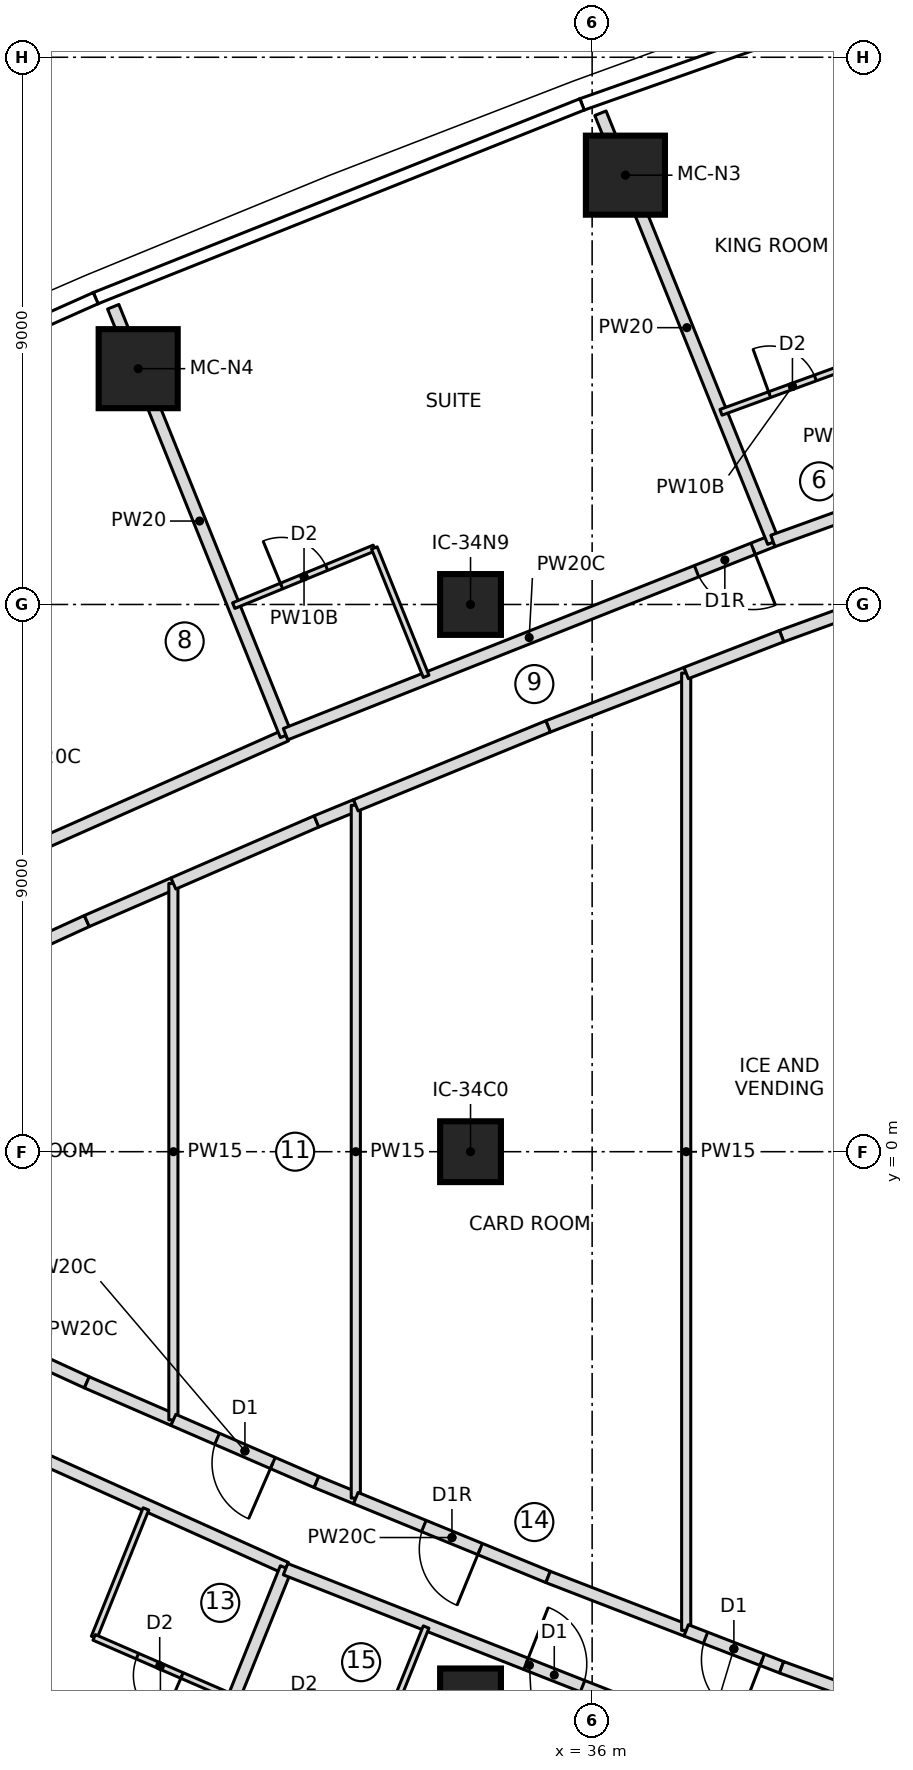
"""IFC4 building model, lengths in metres.
Left out: names, types, materials, properties, quantities, classifications, styles, units other than length and angle.
Written with IfcOpenShell. Run it as: python <this file> out.ifc"""

import sys

from ifc_helpers import new_model, si_unit, direction, frame, frame_2d, origin, origin_2d, place, context, subcontext, project, spatial, rectangle, extrude, element, fill, save


model = new_model("IFC4")
c1 = context("Model", 3, precision=1e-05, world=origin(), true_north=direction((0.0, 1.0)))
c2 = subcontext(c1, "Body", "Model", "MODEL_VIEW")
j1 = project(units=[si_unit("LENGTHUNIT", "METRE"), si_unit("PLANEANGLEUNIT", "RADIAN")], contexts=[c1])
p1 = place(None, origin())
s1 = spatial("IfcSite", under=j1, at=p1, CompositionType="ELEMENT")
p2 = place(p1, origin())
s2 = spatial("IfcBuilding", under=s1, at=p2, CompositionType="ELEMENT")
p3 = place(p2, frame((0.0, 0.0, 175.5)))
s3 = spatial("IfcBuildingStorey", under=s2, at=p3, CompositionType="ELEMENT", Elevation=175.5)
for number, where, z_axis, x_axis in (
    (1, (36.547, 16.061, 0.0), (0.0, 0.0, 1.0), (1.0, 0.0, 0.0)),
    (2, (28.534, 12.878, 0.0), (0.0, 0.0, 1.0), (1.0, 0.0, 0.0)),
):
    element("IfcColumn", number, at=place(p3, frame(where, z_axis=z_axis, x_axis=x_axis)), inside=s3, PredefinedType="COLUMN", context=c2, shape_type="SweptSolid", body=[
        extrude(rectangle(XDim=1.3, YDim=1.3, at=origin_2d()), origin(), (0.0, 0.0, 1.0), 3.55),
    ])
for number, where, z_axis, x_axis in (
    (3, (34.0, -9.0, 0.0), (0.0, 0.0, 1.0), (1.0, 0.0, 0.0)),
    (4, (34.0, 0.0, 0.0), (0.0, 0.0, 1.0), (1.0, 0.0, 0.0)),
    (5, (34.0, 9.0, 0.0), (0.0, 0.0, 1.0), (1.0, 0.0, 0.0)),
):
    element("IfcColumn", number, at=place(p3, frame(where, z_axis=z_axis, x_axis=x_axis)), inside=s3, PredefinedType="COLUMN", context=c2, shape_type="SweptSolid", body=[
        extrude(rectangle(XDim=1.0, YDim=1.0, at=origin_2d()), origin(), (0.0, 0.0, 1.0), 3.55),
    ])
p4 = place(p3, frame((23.085, 3.351, 0.0), z_axis=(0.0, 0.0, 1.0), x_axis=(0.914065936171, 0.405565610392, 0.0)))
e6 = element("IfcWall", 6, at=p4, inside=s3, PredefinedType="PARTITIONING", context=c2, shape_type="SweptSolid", body=[
    extrude(rectangle(XDim=8.622, YDim=0.2, at=frame_2d((4.311, 0.0))), origin(), (0.0, 0.0, 1.0), 3.25),
])
p5 = place(p4, frame((3.05, 0.0, 0.0)))
e7 = element("IfcOpeningElement", 7, at=p5, cuts=e6, PredefinedType="OPENING", context=c2, shape_type="SweptSolid", body=[
    extrude(rectangle(XDim=1.0, YDim=2.1, at=frame_2d((0.5, 1.05))), frame((0.0, 0.11, 0.0), z_axis=(0.0, -1.0, 0.0), x_axis=(1.0, 0.0, 0.0)), (0.0, 0.0, 1.0), 0.22),
])
p6 = place(p3, frame((30.965, 6.848, 0.0), z_axis=(0.0, 0.0, 1.0), x_axis=(-0.373876084216, 0.927478664796, 0.0)))
e8 = element("IfcWall", 8, at=p6, inside=s3, PredefinedType="PARTITIONING", context=c2, shape_type="SweptSolid", body=[
    extrude(rectangle(XDim=7.6, YDim=0.2, at=frame_2d((3.8, 0.0))), origin(), (0.0, 0.0, 1.0), 3.25),
])
p7 = place(p3, frame((38.972, 10.045, 0.0), z_axis=(0.0, 0.0, 1.0), x_axis=(-0.929554647243, -0.368684360651, 0.0)))
e9 = element("IfcWall", 9, at=p7, inside=s3, PredefinedType="PARTITIONING", context=c2, shape_type="SweptSolid", body=[
    extrude(rectangle(XDim=8.622, YDim=0.2, at=frame_2d((4.311, 0.0))), origin(), (0.0, 0.0, 1.0), 3.25),
])
p8 = place(p7, frame((0.35, 0.0, 0.0)))
e10 = element("IfcOpeningElement", 10, at=p8, cuts=e9, PredefinedType="OPENING", context=c2, shape_type="SweptSolid", body=[
    extrude(rectangle(XDim=1.0, YDim=2.1, at=frame_2d((0.5, 1.05))), frame((0.0, 0.11, 0.0), z_axis=(0.0, -1.0, 0.0), x_axis=(1.0, 0.0, 0.0)), (0.0, 0.0, 1.0), 0.22),
])
p9 = place(p3, frame((30.105, 8.981, 0.0), z_axis=(0.0, 0.0, 1.0), x_axis=(0.92519499486, 0.379492057212, 0.0)))
e11 = element("IfcWall", 11, at=p9, inside=s3, PredefinedType="PARTITIONING", context=c2, shape_type="SweptSolid", body=[
    extrude(rectangle(XDim=2.5, YDim=0.1, at=frame_2d((1.25, 0.0))), origin(), (0.0, 0.0, 1.0), 3.25),
])
p10 = place(p9, frame((0.85, 0.0, 0.0)))
e12 = element("IfcOpeningElement", 12, at=p10, cuts=e11, PredefinedType="OPENING", context=c2, shape_type="SweptSolid", body=[
    extrude(rectangle(XDim=0.8, YDim=2.1, at=frame_2d((0.4, 1.05))), frame((0.0, 0.06, 0.0), z_axis=(0.0, -1.0, 0.0), x_axis=(1.0, 0.0, 0.0)), (0.0, 0.0, 1.0), 0.12),
])
p11 = place(p3, frame((32.418, 9.93, 0.0), z_axis=(0.0, 0.0, 1.0), x_axis=(0.373847853912, -0.927490044219, 0.0)))
e13 = element("IfcWall", 13, at=p11, inside=s3, PredefinedType="PARTITIONING", context=c2, shape_type="SweptSolid", body=[
    extrude(rectangle(XDim=2.277, YDim=0.1, at=frame_2d((1.139, 0.0))), origin(), (0.0, 0.0, 1.0), 3.25),
])
p12 = place(p3, frame((38.98, 10.026, 0.0), z_axis=(0.0, 0.0, 1.0), x_axis=(-0.373863662938, 0.927483671843, 0.0)))
e14 = element("IfcWall", 14, at=p12, inside=s3, PredefinedType="PARTITIONING", context=c2, shape_type="SweptSolid", body=[
    extrude(rectangle(XDim=7.604, YDim=0.2, at=frame_2d((3.802, 0.0))), origin(), (0.0, 0.0, 1.0), 3.25),
])
p13 = place(p3, frame((43.026, 11.507, 0.0), z_axis=(0.0, 0.0, 1.0), x_axis=(-0.940653905433, -0.339367397069, 0.0)))
e15 = element("IfcWall", 15, at=p13, inside=s3, PredefinedType="PARTITIONING", context=c2, shape_type="SweptSolid", body=[
    extrude(rectangle(XDim=4.309, YDim=0.2, at=frame_2d((2.155, 0.0))), origin(), (0.0, 0.0, 1.0), 3.25),
])
p14 = place(p13, frame((0.4, 0.0, 0.0)))
e16 = element("IfcOpeningElement", 16, at=p14, cuts=e15, PredefinedType="OPENING", context=c2, shape_type="SweptSolid", body=[
    extrude(rectangle(XDim=1.0, YDim=2.1, at=frame_2d((0.5, 1.05))), frame((0.0, 0.11, 0.0), z_axis=(0.0, -1.0, 0.0), x_axis=(1.0, 0.0, 0.0)), (0.0, 0.0, 1.0), 0.22),
])
p15 = place(p3, frame((38.119, 12.161, 0.0), z_axis=(0.0, 0.0, 1.0), x_axis=(0.939744972593, 0.341876273652, 0.0)))
e17 = element("IfcWall", 17, at=p15, inside=s3, PredefinedType="PARTITIONING", context=c2, shape_type="SweptSolid", body=[
    extrude(rectangle(XDim=2.501, YDim=0.1, at=frame_2d((1.251, 0.0))), origin(), (0.0, 0.0, 1.0), 3.25),
])
p16 = place(p15, frame((0.85, 0.0, 0.0)))
e18 = element("IfcOpeningElement", 18, at=p16, cuts=e17, PredefinedType="OPENING", context=c2, shape_type="SweptSolid", body=[
    extrude(rectangle(XDim=0.8, YDim=2.1, at=frame_2d((0.4, 1.05))), frame((0.0, 0.06, 0.0), z_axis=(0.0, -1.0, 0.0), x_axis=(1.0, 0.0, 0.0)), (0.0, 0.0, 1.0), 0.12),
])
p17 = place(p3, frame((21.704, -2.685, 0.0), z_axis=(0.0, 0.0, 1.0), x_axis=(0.912095082087, -0.409978732659, 0.0)))
e19 = element("IfcWall", 19, at=p17, inside=s3, PredefinedType="PARTITIONING", context=c2, shape_type="SweptSolid", body=[
    extrude(rectangle(XDim=10.154, YDim=0.2, at=frame_2d((5.077, 0.0))), origin(), (0.0, 0.0, 1.0), 3.25),
])
p18 = place(p17, frame((0.45, 0.0, 0.0)))
e20 = element("IfcOpeningElement", 20, at=p18, cuts=e19, PredefinedType="OPENING", context=c2, shape_type="SweptSolid", body=[
    extrude(rectangle(XDim=1.5, YDim=2.1, at=frame_2d((0.75, 1.05))), frame((0.0, 0.11, 0.0), z_axis=(0.0, -1.0, 0.0), x_axis=(1.0, 0.0, 0.0)), (0.0, 0.0, 1.0), 0.22),
])
p19 = place(p3, frame((27.81, -7.988, 0.0), z_axis=(0.0, 0.0, 1.0), x_axis=(0.373865727953, 0.927482839443, 0.0)))
e21 = element("IfcWall", 21, at=p19, inside=s3, PredefinedType="PARTITIONING", context=c2, shape_type="SweptSolid", body=[
    extrude(rectangle(XDim=2.278, YDim=0.1, at=frame_2d((1.139, 0.0))), origin(), (0.0, 0.0, 1.0), 3.25),
])
p20 = place(p3, frame((29.989, -8.933, 0.0), z_axis=(0.0, 0.0, 1.0), x_axis=(-0.917386792713, 0.397996824805, 0.0)))
e22 = element("IfcWall", 22, at=p20, inside=s3, PredefinedType="PARTITIONING", context=c2, shape_type="SweptSolid", body=[
    extrude(rectangle(XDim=2.375, YDim=0.1, at=frame_2d((1.188, 0.0))), origin(), (0.0, 0.0, 1.0), 3.25),
])
p21 = place(p20, frame((0.8, 0.0, 0.0)))
e23 = element("IfcOpeningElement", 23, at=p21, cuts=e22, PredefinedType="OPENING", context=c2, shape_type="SweptSolid", body=[
    extrude(rectangle(XDim=0.8, YDim=2.1, at=frame_2d((0.4, 1.05))), frame((0.0, 0.06, 0.0), z_axis=(0.0, -1.0, 0.0), x_axis=(1.0, 0.0, 0.0)), (0.0, 0.0, 1.0), 0.12),
])
p22 = place(p3, frame((28.124, -13.897, 0.0), z_axis=(0.0, 0.0, 1.0), x_axis=(0.373876084216, 0.927478664796, 0.0)))
e24 = element("IfcWall", 24, at=p22, inside=s3, PredefinedType="PARTITIONING", context=c2, shape_type="SweptSolid", body=[
    extrude(rectangle(XDim=7.6, YDim=0.2, at=frame_2d((3.8, 0.0))), origin(), (0.0, 0.0, 1.0), 3.25),
])
p23 = place(p3, frame((30.958, -6.866, 0.0), z_axis=(0.0, 0.0, 1.0), x_axis=(0.93040517394, -0.366532689274, 0.0)))
e25 = element("IfcWall", 25, at=p23, inside=s3, PredefinedType="PARTITIONING", context=c2, shape_type="SweptSolid", body=[
    extrude(rectangle(XDim=8.622, YDim=0.2, at=frame_2d((4.311, 0.0))), origin(), (0.0, 0.0, 1.0), 3.25),
])
p24 = place(p23, frame((4.25, 0.0, 0.0)))
e26 = element("IfcOpeningElement", 26, at=p24, cuts=e25, PredefinedType="OPENING", context=c2, shape_type="SweptSolid", body=[
    extrude(rectangle(XDim=1.0, YDim=2.1, at=frame_2d((0.5, 1.05))), frame((0.0, 0.11, 0.0), z_axis=(0.0, -1.0, 0.0), x_axis=(1.0, 0.0, 0.0)), (0.0, 0.0, 1.0), 0.22),
])
p25 = place(p3, frame((33.27, -7.818, 0.0), z_axis=(0.0, 0.0, 1.0), x_axis=(-0.373847853912, -0.927490044219, 0.0)))
e27 = element("IfcWall", 27, at=p25, inside=s3, PredefinedType="PARTITIONING", context=c2, shape_type="SweptSolid", body=[
    extrude(rectangle(XDim=2.277, YDim=0.1, at=frame_2d((1.139, 0.0))), origin(), (0.0, 0.0, 1.0), 3.25),
])
p26 = place(p3, frame((27.69, -3.793, 0.0), z_axis=(0.0, 0.0, 1.0), x_axis=(-0.909180834404, 0.416401501382, 0.0)))
e28 = element("IfcWall", 28, at=p26, inside=s3, PredefinedType="PARTITIONING", context=c2, shape_type="SweptSolid", body=[
    extrude(rectangle(XDim=4.117, YDim=0.2, at=frame_2d((2.059, 0.0))), origin(), (0.0, 0.0, 1.0), 3.25),
])
p27 = place(p26, frame((1.559, 0.0, 0.0)))
e29 = element("IfcOpeningElement", 29, at=p27, cuts=e28, PredefinedType="OPENING", context=c2, shape_type="SweptSolid", body=[
    extrude(rectangle(XDim=1.0, YDim=2.1, at=frame_2d((0.5, 1.05))), frame((0.0, 0.11, 0.0), z_axis=(0.0, -1.0, 0.0), x_axis=(1.0, 0.0, 0.0)), (0.0, 0.0, 1.0), 0.22),
])
p28 = place(p3, frame((23.947, 2.079, 0.0), z_axis=(0.0, 0.0, 1.0), x_axis=(0.909180834404, 0.416401501382, 0.0)))
e30 = element("IfcWall", 30, at=p28, inside=s3, PredefinedType="PARTITIONING", context=c2, shape_type="SweptSolid", body=[
    extrude(rectangle(XDim=4.117, YDim=0.2, at=frame_2d((2.059, 0.0))), origin(), (0.0, 0.0, 1.0), 3.25),
])
for number, where, z_axis, x_axis in (
    (31, (27.69, 3.793, 0.0), (0.0, 0.0, 1.0), (0.917, 0.398, 0.0)),
    (32, (29.113, -4.411, 0.0), (0.0, 0.0, 1.0), (-0.917, 0.398, 0.0)),
):
    element("IfcWall", number, at=place(p3, frame(where, z_axis=z_axis, x_axis=x_axis)), inside=s3, PredefinedType="PARTITIONING", context=c2, shape_type="SweptSolid", body=[
        extrude(rectangle(XDim=1.552, YDim=0.2, at=frame_2d((0.776, 0.0))), origin(), (0.0, 0.0, 1.0), 3.25),
    ])
p29 = place(p3, frame((29.113, -4.411, 0.0), z_axis=(0.0, 0.0, 1.0), x_axis=(0.0, 1.0, 0.0)))
e33 = element("IfcWall", 33, at=p29, inside=s3, PredefinedType="PARTITIONING", context=c2, shape_type="SweptSolid", body=[
    extrude(rectangle(XDim=8.822, YDim=0.15, at=frame_2d((4.411, 0.0))), origin(), (0.0, 0.0, 1.0), 3.25),
])
p30 = place(p3, frame((31.467, -5.432, 0.0), z_axis=(0.0, 0.0, 1.0), x_axis=(-0.91737845263, 0.398016048231, 0.0)))
e34 = element("IfcWall", 34, at=p30, inside=s3, PredefinedType="PARTITIONING", context=c2, shape_type="SweptSolid", body=[
    extrude(rectangle(XDim=2.565, YDim=0.2, at=frame_2d((1.283, 0.0))), origin(), (0.0, 0.0, 1.0), 3.25),
])
p31 = place(p30, frame((0.783, 0.0, 0.0)))
e35 = element("IfcOpeningElement", 35, at=p31, cuts=e34, PredefinedType="OPENING", context=c2, shape_type="SweptSolid", body=[
    extrude(rectangle(XDim=1.0, YDim=2.1, at=frame_2d((0.5, 1.05))), frame((0.0, 0.11, 0.0), z_axis=(0.0, -1.0, 0.0), x_axis=(1.0, 0.0, 0.0)), (0.0, 0.0, 1.0), 0.22),
])
p32 = place(p3, frame((32.113, -5.697, 0.0), z_axis=(0.0, 0.0, 1.0), x_axis=(-0.92526293873, 0.379326368992, 0.0)))
e36 = element("IfcWall", 36, at=p32, inside=s3, PredefinedType="PARTITIONING", context=c2, shape_type="SweptSolid", body=[
    extrude(rectangle(XDim=0.699, YDim=0.2, at=frame_2d((0.35, 0.0))), origin(), (0.0, 0.0, 1.0), 3.25),
])
p33 = place(p3, frame((29.113, 4.411, 0.0), z_axis=(0.0, 0.0, 1.0), x_axis=(0.91737845263, 0.398016048231, 0.0)))
e37 = element("IfcWall", 37, at=p33, inside=s3, PredefinedType="PARTITIONING", context=c2, shape_type="SweptSolid", body=[
    extrude(rectangle(XDim=2.565, YDim=0.2, at=frame_2d((1.283, 0.0))), origin(), (0.0, 0.0, 1.0), 3.25),
])
p34 = place(p3, frame((31.467, 5.432, 0.0), z_axis=(0.0, 0.0, 1.0), x_axis=(0.92526293873, 0.379326368992, 0.0)))
e38 = element("IfcWall", 38, at=p34, inside=s3, PredefinedType="PARTITIONING", context=c2, shape_type="SweptSolid", body=[
    extrude(rectangle(XDim=0.699, YDim=0.2, at=frame_2d((0.35, 0.0))), origin(), (0.0, 0.0, 1.0), 3.25),
])
p35 = place(p3, frame((32.113, -5.697, 0.0), z_axis=(0.0, 0.0, 1.0), x_axis=(0.0, 1.0, 0.0)))
e39 = element("IfcWall", 39, at=p35, inside=s3, PredefinedType="PARTITIONING", context=c2, shape_type="SweptSolid", body=[
    extrude(rectangle(XDim=11.395, YDim=0.15, at=frame_2d((5.697, 0.0))), origin(), (0.0, 0.0, 1.0), 3.25),
])
p36 = place(p3, frame((35.276, -6.994, 0.0), z_axis=(0.0, 0.0, 1.0), x_axis=(-0.925194984271, 0.379492083026, 0.0)))
e40 = element("IfcWall", 40, at=p36, inside=s3, PredefinedType="PARTITIONING", context=c2, shape_type="SweptSolid", body=[
    extrude(rectangle(XDim=3.418, YDim=0.2, at=frame_2d((1.709, 0.0))), origin(), (0.0, 0.0, 1.0), 3.25),
])
p37 = place(p36, frame((1.209, 0.0, 0.0)))
e41 = element("IfcOpeningElement", 41, at=p37, cuts=e40, PredefinedType="OPENING", context=c2, shape_type="SweptSolid", body=[
    extrude(rectangle(XDim=1.0, YDim=2.1, at=frame_2d((0.5, 1.05))), frame((0.0, 0.11, 0.0), z_axis=(0.0, -1.0, 0.0), x_axis=(1.0, 0.0, 0.0)), (0.0, 0.0, 1.0), 0.22),
])
for number, where, z_axis, x_axis in (
    (42, (35.276, 6.994, 0.0), (0.0, 0.0, 1.0), (0.933, 0.361, 0.0)),
    (43, (37.547, -7.873, 0.0), (0.0, 0.0, 1.0), (-0.933, 0.361, 0.0)),
):
    element("IfcWall", number, at=place(p3, frame(where, z_axis=z_axis, x_axis=x_axis)), inside=s3, PredefinedType="PARTITIONING", context=c2, shape_type="SweptSolid", body=[
        extrude(rectangle(XDim=2.435, YDim=0.2, at=frame_2d((1.218, 0.0))), origin(), (0.0, 0.0, 1.0), 3.25),
    ])
p38 = place(p3, frame((32.113, 5.697, 0.0), z_axis=(0.0, 0.0, 1.0), x_axis=(0.925194984271, 0.379492083026, 0.0)))
e44 = element("IfcWall", 44, at=p38, inside=s3, PredefinedType="PARTITIONING", context=c2, shape_type="SweptSolid", body=[
    extrude(rectangle(XDim=3.418, YDim=0.2, at=frame_2d((1.709, 0.0))), origin(), (0.0, 0.0, 1.0), 3.25),
])
p39 = place(p3, frame((37.547, -7.873, 0.0), z_axis=(0.0, 0.0, 1.0), x_axis=(0.0, 1.0, 0.0)))
e45 = element("IfcWall", 45, at=p39, inside=s3, PredefinedType="PARTITIONING", context=c2, shape_type="SweptSolid", body=[
    extrude(rectangle(XDim=15.746, YDim=0.15, at=frame_2d((7.873, 0.0))), origin(), (0.0, 0.0, 1.0), 3.25),
])
p40 = place(p3, frame((39.115, -8.479, 0.0), z_axis=(0.0, 0.0, 1.0), x_axis=(-0.932670528514, 0.360729379511, 0.0)))
e46 = element("IfcWall", 46, at=p40, inside=s3, PredefinedType="PARTITIONING", context=c2, shape_type="SweptSolid", body=[
    extrude(rectangle(XDim=1.682, YDim=0.2, at=frame_2d((0.841, 0.0))), origin(), (0.0, 0.0, 1.0), 3.25),
])
p41 = place(p40, frame((0.341, 0.0, 0.0)))
e47 = element("IfcOpeningElement", 47, at=p41, cuts=e46, PredefinedType="OPENING", context=c2, shape_type="SweptSolid", body=[
    extrude(rectangle(XDim=1.0, YDim=2.1, at=frame_2d((0.5, 1.05))), frame((0.0, 0.11, 0.0), z_axis=(0.0, -1.0, 0.0), x_axis=(1.0, 0.0, 0.0)), (0.0, 0.0, 1.0), 0.22),
])
for number, where, z_axis, x_axis in (
    (48, (39.115, 8.479, 0.0), (0.0, 0.0, 1.0), (0.94, 0.342, 0.0)),
    (49, (40.547, -9.0, 0.0), (0.0, 0.0, 1.0), (-0.94, 0.342, 0.0)),
):
    element("IfcWall", number, at=place(p3, frame(where, z_axis=z_axis, x_axis=x_axis)), inside=s3, PredefinedType="PARTITIONING", context=c2, shape_type="SweptSolid", body=[
        extrude(rectangle(XDim=1.523, YDim=0.2, at=frame_2d((0.762, 0.0))), origin(), (0.0, 0.0, 1.0), 3.25),
    ])
p42 = place(p3, frame((37.547, 7.873, 0.0), z_axis=(0.0, 0.0, 1.0), x_axis=(0.932670528514, 0.360729379511, 0.0)))
e50 = element("IfcWall", 50, at=p42, inside=s3, PredefinedType="PARTITIONING", context=c2, shape_type="SweptSolid", body=[
    extrude(rectangle(XDim=1.682, YDim=0.2, at=frame_2d((0.841, 0.0))), origin(), (0.0, 0.0, 1.0), 3.25),
])
p43 = place(p10, origin())
e51 = element("IfcDoor", 51, at=p43, inside=s3, OperationType="SINGLE_SWING_LEFT", PredefinedType="DOOR", context=c2, shape_type="SweptSolid", body=[
    extrude(rectangle(XDim=0.8, YDim=2.1, at=frame_2d((0.4, 1.05))), frame((0.0, 0.025, 0.0), z_axis=(0.0, -1.0, 0.0), x_axis=(1.0, 0.0, 0.0)), (0.0, 0.0, 1.0), 0.05),
])
fill(e12, e51)
p44 = place(p8, origin())
e52 = element("IfcDoor", 52, at=p44, inside=s3, OperationType="SINGLE_SWING_RIGHT", PredefinedType="DOOR", context=c2, shape_type="SweptSolid", body=[
    extrude(rectangle(XDim=1.0, YDim=2.1, at=frame_2d((0.5, 1.05))), frame((0.0, 0.025, 0.0), z_axis=(0.0, -1.0, 0.0), x_axis=(1.0, 0.0, 0.0)), (0.0, 0.0, 1.0), 0.05),
])
fill(e10, e52)
p45 = place(p16, origin())
e53 = element("IfcDoor", 53, at=p45, inside=s3, OperationType="SINGLE_SWING_LEFT", PredefinedType="DOOR", context=c2, shape_type="SweptSolid", body=[
    extrude(rectangle(XDim=0.8, YDim=2.1, at=frame_2d((0.4, 1.05))), frame((0.0, 0.025, 0.0), z_axis=(0.0, -1.0, 0.0), x_axis=(1.0, 0.0, 0.0)), (0.0, 0.0, 1.0), 0.05),
])
fill(e18, e53)
p46 = place(p21, origin())
e54 = element("IfcDoor", 54, at=p46, inside=s3, OperationType="SINGLE_SWING_LEFT", PredefinedType="DOOR", context=c2, shape_type="SweptSolid", body=[
    extrude(rectangle(XDim=0.8, YDim=2.1, at=frame_2d((0.4, 1.05))), frame((0.0, 0.025, 0.0), z_axis=(0.0, -1.0, 0.0), x_axis=(1.0, 0.0, 0.0)), (0.0, 0.0, 1.0), 0.05),
])
fill(e23, e54)
p47 = place(p24, origin())
e55 = element("IfcDoor", 55, at=p47, inside=s3, OperationType="SINGLE_SWING_LEFT", PredefinedType="DOOR", context=c2, shape_type="SweptSolid", body=[
    extrude(rectangle(XDim=1.0, YDim=2.1, at=frame_2d((0.5, 1.05))), frame((0.0, 0.025, 0.0), z_axis=(0.0, -1.0, 0.0), x_axis=(1.0, 0.0, 0.0)), (0.0, 0.0, 1.0), 0.05),
])
fill(e26, e55)
p48 = place(p31, origin())
e56 = element("IfcDoor", 56, at=p48, inside=s3, OperationType="SINGLE_SWING_LEFT", PredefinedType="DOOR", context=c2, shape_type="SweptSolid", body=[
    extrude(rectangle(XDim=1.0, YDim=2.1, at=frame_2d((0.5, 1.05))), frame((0.0, 0.025, 0.0), z_axis=(0.0, -1.0, 0.0), x_axis=(1.0, 0.0, 0.0)), (0.0, 0.0, 1.0), 0.05),
])
fill(e35, e56)
p49 = place(p37, origin())
e57 = element("IfcDoor", 57, at=p49, inside=s3, OperationType="SINGLE_SWING_RIGHT", PredefinedType="DOOR", context=c2, shape_type="SweptSolid", body=[
    extrude(rectangle(XDim=1.0, YDim=2.1, at=frame_2d((0.5, 1.05))), frame((0.0, 0.025, 0.0), z_axis=(0.0, -1.0, 0.0), x_axis=(1.0, 0.0, 0.0)), (0.0, 0.0, 1.0), 0.05),
])
fill(e41, e57)
p50 = place(p41, origin())
e58 = element("IfcDoor", 58, at=p50, inside=s3, OperationType="SINGLE_SWING_LEFT", PredefinedType="DOOR", context=c2, shape_type="SweptSolid", body=[
    extrude(rectangle(XDim=1.0, YDim=2.1, at=frame_2d((0.5, 1.05))), frame((0.0, 0.025, 0.0), z_axis=(0.0, -1.0, 0.0), x_axis=(1.0, 0.0, 0.0)), (0.0, 0.0, 1.0), 0.05),
])
fill(e47, e58)
save(model, sys.argv[1])
